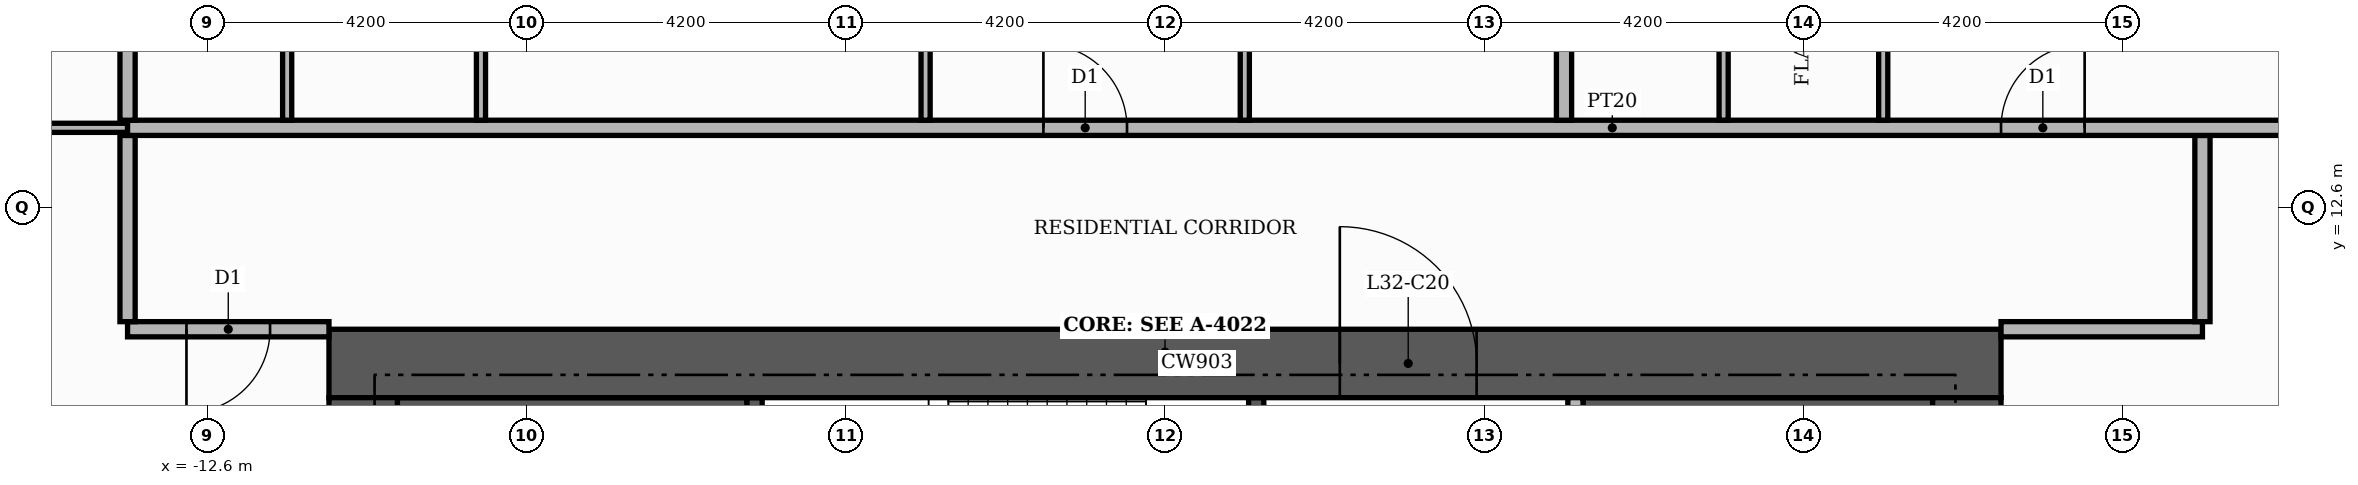
"""IFC4 building model, lengths in metres.
Left out: names, types, materials, properties, quantities, classifications, styles, units other than length and angle.
Written with IfcOpenShell. Run it as: python <this file> out.ifc"""

import sys

from ifc_helpers import new_model, si_unit, direction, frame, frame_2d, origin, place, context, subcontext, project, spatial, rectangle, extrude, element, fill, save


model = new_model("IFC4")
c1 = context("Model", 3, precision=1e-05, world=origin(), true_north=direction((0.0, 1.0)))
c2 = subcontext(c1, "Body", "Model", "MODEL_VIEW")
j1 = project(units=[si_unit("LENGTHUNIT", "METRE"), si_unit("PLANEANGLEUNIT", "RADIAN")], contexts=[c1])
p1 = place(None, origin())
s1 = spatial("IfcSite", under=j1, at=p1, CompositionType="ELEMENT")
p2 = place(p1, origin())
s2 = spatial("IfcBuilding", under=s1, at=p2, CompositionType="ELEMENT")
p3 = place(p2, frame((0.0, 0.0, 137.7)))
s3 = spatial("IfcBuildingStorey", under=s2, at=p3, CompositionType="ELEMENT", Elevation=137.7)
for number, where, z_axis, x_axis in (
    (1, (-10.1, 9.15, 0.0), (0.0, 0.0, 1.0), (1.0, 0.0, 0.0)),
    (2, (5.5, 9.15, 0.0), (0.0, 0.0, 1.0), (1.0, 0.0, 0.0)),
):
    element("IfcWall", number, at=place(p3, frame(where, z_axis=z_axis, x_axis=x_axis)), inside=s3, PredefinedType="SHEAR", context=c2, shape_type="SweptSolid", body=[
        extrude(rectangle(XDim=4.6, YDim=1.9, at=frame_2d((2.3, 0.0))), origin(), (0.0, 0.0, 1.0), 3.48),
    ])
p4 = place(p3, frame((-5.4, 7.25, 0.0), z_axis=(0.0, 0.0, 1.0), x_axis=(0.0, 1.0, 0.0)))
e3 = element("IfcWall", 3, at=p4, inside=s3, PredefinedType="SHEAR", context=c2, shape_type="SweptSolid", body=[
    extrude(rectangle(XDim=2.85, YDim=0.2, at=frame_2d((1.425, 0.0))), origin(), (0.0, 0.0, 1.0), 3.48),
])
p5 = place(p3, frame((1.2, 7.25, 0.0), z_axis=(0.0, 0.0, 1.0), x_axis=(0.0, 1.0, 0.0)))
e4 = element("IfcWall", 4, at=p5, inside=s3, PredefinedType="SHEAR", context=c2, shape_type="SweptSolid", body=[
    extrude(rectangle(XDim=2.85, YDim=0.2, at=frame_2d((1.425, 0.0))), origin(), (0.0, 0.0, 1.0), 3.48),
])
p6 = place(p5, frame((0.85, 0.0, 0.0)))
e5 = element("IfcOpeningElement", 5, at=p6, cuts=e4, PredefinedType="OPENING", context=c2, shape_type="SweptSolid", body=[
    extrude(rectangle(XDim=1.0, YDim=2.1, at=frame_2d((0.5, 1.05))), frame((0.0, 0.11, 0.0), z_axis=(0.0, -1.0, 0.0), x_axis=(1.0, 0.0, 0.0)), (0.0, 0.0, 1.0), 0.22),
])
p7 = place(p3, frame((-11.0, 10.55, 0.0), z_axis=(0.0, 0.0, 1.0), x_axis=(1.0, 0.0, 0.0)))
e6 = element("IfcWall", 6, at=p7, inside=s3, PredefinedType="SHEAR", context=c2, shape_type="SweptSolid", body=[
    extrude(rectangle(XDim=22.0, YDim=0.9, at=frame_2d((11.0, 0.0))), origin(), (0.0, 0.0, 1.0), 3.48),
])
p8 = place(p7, frame((13.3, 0.0, 0.0)))
e7 = element("IfcOpeningElement", 7, at=p8, cuts=e6, PredefinedType="OPENING", context=c2, shape_type="SweptSolid", body=[
    extrude(rectangle(XDim=1.8, YDim=2.2, at=frame_2d((0.9, 1.1))), frame((0.0, 0.46, 0.0), z_axis=(0.0, -1.0, 0.0), x_axis=(1.0, 0.0, 0.0)), (0.0, 0.0, 1.0), 0.92),
])
for number, where, z_axis, x_axis in (
    (8, (-10.55, -10.1, 0.0), (0.0, 0.0, 1.0), (0.0, 1.0, 0.0)),
    (9, (10.55, -10.1, 0.0), (0.0, 0.0, 1.0), (0.0, 1.0, 0.0)),
):
    element("IfcWall", number, at=place(p3, frame(where, z_axis=z_axis, x_axis=x_axis)), inside=s3, PredefinedType="SHEAR", context=c2, shape_type="SweptSolid", body=[
        extrude(rectangle(XDim=20.2, YDim=0.9, at=frame_2d((10.1, 0.0))), origin(), (0.0, 0.0, 1.0), 3.48),
    ])
p9 = place(p3, frame((5.4, 5.5, 0.0), z_axis=(0.0, 0.0, 1.0), x_axis=(0.0, 1.0, 0.0)))
e10 = element("IfcWall", 10, at=p9, inside=s3, PredefinedType="PARTITIONING", context=c2, shape_type="SweptSolid", body=[
    extrude(rectangle(XDim=4.6, YDim=0.2, at=frame_2d((2.3, 0.0))), origin(), (0.0, 0.0, 1.0), 3.48),
])
p10 = place(p9, frame((0.25, 0.0, 0.0)))
e11 = element("IfcOpeningElement", 11, at=p10, cuts=e10, PredefinedType="OPENING", context=c2, shape_type="SweptSolid", body=[
    extrude(rectangle(XDim=1.0, YDim=2.1, at=frame_2d((0.5, 1.05))), frame((0.0, 0.11, 0.0), z_axis=(0.0, -1.0, 0.0), x_axis=(1.0, 0.0, 0.0)), (0.0, 0.0, 1.0), 0.22),
])
p11 = place(p3, frame((-13.65, 11.0, 0.0), z_axis=(0.0, 0.0, 1.0), x_axis=(1.0, 0.0, 0.0)))
e12 = element("IfcWall", 12, at=p11, inside=s3, PredefinedType="PARTITIONING", context=c2, shape_type="SweptSolid", body=[
    extrude(rectangle(XDim=2.65, YDim=0.2, at=frame_2d((1.325, 0.0))), origin(), (0.0, 0.0, 1.0), 3.48),
])
p12 = place(p11, frame((0.775, 0.0, 0.0)))
e13 = element("IfcOpeningElement", 13, at=p12, cuts=e12, PredefinedType="OPENING", context=c2, shape_type="SweptSolid", body=[
    extrude(rectangle(XDim=1.1, YDim=2.4, at=frame_2d((0.55, 1.2))), frame((0.0, 0.11, 0.0), z_axis=(0.0, -1.0, 0.0), x_axis=(1.0, 0.0, 0.0)), (0.0, 0.0, 1.0), 0.22),
])
p13 = place(p3, frame((11.0, 11.0, 0.0), z_axis=(0.0, 0.0, 1.0), x_axis=(1.0, 0.0, 0.0)))
e14 = element("IfcWall", 14, at=p13, inside=s3, PredefinedType="PARTITIONING", context=c2, shape_type="SweptSolid", body=[
    extrude(rectangle(XDim=2.65, YDim=0.2, at=frame_2d((1.325, 0.0))), origin(), (0.0, 0.0, 1.0), 3.48),
])
for number, where, z_axis, x_axis in (
    (15, (-13.65, 11.1, 0.0), (0.0, 0.0, 1.0), (0.0, 1.0, 0.0)),
    (16, (13.65, 11.1, 0.0), (0.0, 0.0, 1.0), (0.0, 1.0, 0.0)),
):
    element("IfcWall", number, at=place(p3, frame(where, z_axis=z_axis, x_axis=x_axis)), inside=s3, PredefinedType="PARTITIONING", context=c2, shape_type="SweptSolid", body=[
        extrude(rectangle(XDim=2.45, YDim=0.2, at=frame_2d((1.225, 0.0))), origin(), (0.0, 0.0, 1.0), 3.48),
    ])
p14 = place(p3, frame((-20.42, 13.65, 0.0), z_axis=(0.0, 0.0, 1.0), x_axis=(1.0, 0.0, 0.0)))
e17 = element("IfcWall", 17, at=p14, inside=s3, PredefinedType="PARTITIONING", context=c2, shape_type="SweptSolid", body=[
    extrude(rectangle(XDim=6.77, YDim=0.12, at=frame_2d((3.385, 0.0))), origin(), (0.0, 0.0, 1.0), 3.48),
])
p15 = place(p14, frame((2.935, 0.0, 0.0)))
e18 = element("IfcOpeningElement", 18, at=p15, cuts=e17, PredefinedType="OPENING", context=c2, shape_type="SweptSolid", body=[
    extrude(rectangle(XDim=0.9, YDim=2.1, at=frame_2d((0.45, 1.05))), frame((0.0, 0.07, 0.0), z_axis=(0.0, -1.0, 0.0), x_axis=(1.0, 0.0, 0.0)), (0.0, 0.0, 1.0), 0.14),
])
p16 = place(p3, frame((-13.65, 13.65, 0.0), z_axis=(0.0, 0.0, 1.0), x_axis=(1.0, 0.0, 0.0)))
e19 = element("IfcWall", 19, at=p16, inside=s3, PredefinedType="PARTITIONING", context=c2, shape_type="SweptSolid", body=[
    extrude(rectangle(XDim=39.07, YDim=0.2, at=frame_2d((19.535, 0.0))), origin(), (0.0, 0.0, 1.0), 3.48),
])
p17 = place(p16, frame((24.65, 0.0, 0.0)))
e20 = element("IfcOpeningElement", 20, at=p17, cuts=e19, PredefinedType="OPENING", context=c2, shape_type="SweptSolid", body=[
    extrude(rectangle(XDim=1.1, YDim=2.4, at=frame_2d((0.55, 1.2))), frame((0.0, 0.11, 0.0), z_axis=(0.0, -1.0, 0.0), x_axis=(1.0, 0.0, 0.0)), (0.0, 0.0, 1.0), 0.22),
])
p18 = place(p16, frame((12.05, 0.0, 0.0)))
e21 = element("IfcOpeningElement", 21, at=p18, cuts=e19, PredefinedType="OPENING", context=c2, shape_type="SweptSolid", body=[
    extrude(rectangle(XDim=1.1, YDim=2.4, at=frame_2d((0.55, 1.2))), frame((0.0, 0.11, 0.0), z_axis=(0.0, -1.0, 0.0), x_axis=(1.0, 0.0, 0.0)), (0.0, 0.0, 1.0), 0.22),
])
p19 = place(p3, frame((-13.65, 13.75, 0.0), z_axis=(0.0, 0.0, 1.0), x_axis=(0.0, 1.0, 0.0)))
e22 = element("IfcWall", 22, at=p19, inside=s3, PredefinedType="PARTITIONING", context=c2, shape_type="SweptSolid", body=[
    extrude(rectangle(XDim=11.67, YDim=0.2, at=frame_2d((5.835, 0.0))), origin(), (0.0, 0.0, 1.0), 3.48),
])
for number, where, z_axis, x_axis in (
    (23, (-11.55, 13.75, 0.0), (0.0, 0.0, 1.0), (0.0, 1.0, 0.0)),
    (24, (-9.0, 13.75, 0.0), (0.0, 0.0, 1.0), (0.0, 1.0, 0.0)),
    (25, (-3.15, 13.75, 0.0), (0.0, 0.0, 1.0), (0.0, 1.0, 0.0)),
):
    element("IfcWall", number, at=place(p3, frame(where, z_axis=z_axis, x_axis=x_axis)), inside=s3, PredefinedType="PARTITIONING", context=c2, shape_type="SweptSolid", body=[
        extrude(rectangle(XDim=4.51, YDim=0.12, at=frame_2d((2.255, 0.0))), origin(), (0.0, 0.0, 1.0), 3.48),
    ])
p20 = place(p3, frame((1.05, 13.75, 0.0), z_axis=(0.0, 0.0, 1.0), x_axis=(0.0, 1.0, 0.0)))
e26 = element("IfcWall", 26, at=p20, inside=s3, PredefinedType="PARTITIONING", context=c2, shape_type="SweptSolid", body=[
    extrude(rectangle(XDim=4.51, YDim=0.12, at=frame_2d((2.255, 0.0))), origin(), (0.0, 0.0, 1.0), 3.48),
])
p21 = place(p20, frame((1.735, 0.0, 0.0)))
e27 = element("IfcOpeningElement", 27, at=p21, cuts=e26, PredefinedType="OPENING", context=c2, shape_type="SweptSolid", body=[
    extrude(rectangle(XDim=1.0, YDim=2.1, at=frame_2d((0.5, 1.05))), frame((0.0, 0.07, 0.0), z_axis=(0.0, -1.0, 0.0), x_axis=(1.0, 0.0, 0.0)), (0.0, 0.0, 1.0), 0.14),
])
p22 = place(p3, frame((5.25, 13.75, 0.0), z_axis=(0.0, 0.0, 1.0), x_axis=(0.0, 1.0, 0.0)))
e28 = element("IfcWall", 28, at=p22, inside=s3, PredefinedType="PARTITIONING", context=c2, shape_type="SweptSolid", body=[
    extrude(rectangle(XDim=11.67, YDim=0.2, at=frame_2d((5.835, 0.0))), origin(), (0.0, 0.0, 1.0), 3.48),
])
p23 = place(p3, frame((7.35, 13.75, 0.0), z_axis=(0.0, 0.0, 1.0), x_axis=(0.0, 1.0, 0.0)))
e29 = element("IfcWall", 29, at=p23, inside=s3, PredefinedType="PARTITIONING", context=c2, shape_type="SweptSolid", body=[
    extrude(rectangle(XDim=5.11, YDim=0.12, at=frame_2d((2.555, 0.0))), origin(), (0.0, 0.0, 1.0), 3.48),
])
p24 = place(p3, frame((9.45, 13.75, 0.0), z_axis=(0.0, 0.0, 1.0), x_axis=(0.0, 1.0, 0.0)))
e30 = element("IfcWall", 30, at=p24, inside=s3, PredefinedType="PARTITIONING", context=c2, shape_type="SweptSolid", body=[
    extrude(rectangle(XDim=5.11, YDim=0.12, at=frame_2d((2.555, 0.0))), origin(), (0.0, 0.0, 1.0), 3.48),
])
p25 = place(p24, frame((2.085, 0.0, 0.0)))
e31 = element("IfcOpeningElement", 31, at=p25, cuts=e30, PredefinedType="OPENING", context=c2, shape_type="SweptSolid", body=[
    extrude(rectangle(XDim=0.9, YDim=2.1, at=frame_2d((0.45, 1.05))), frame((0.0, 0.07, 0.0), z_axis=(0.0, -1.0, 0.0), x_axis=(1.0, 0.0, 0.0)), (0.0, 0.0, 1.0), 0.14),
])
p26 = place(p8, origin())
e32 = element("IfcDoor", 32, at=p26, inside=s3, OperationType="DOUBLE_DOOR_SINGLE_SWING", PredefinedType="DOOR", context=c2, shape_type="SweptSolid", body=[
    extrude(rectangle(XDim=1.8, YDim=2.2, at=frame_2d((0.9, 1.1))), frame((0.0, 0.025, 0.0), z_axis=(0.0, -1.0, 0.0), x_axis=(1.0, 0.0, 0.0)), (0.0, 0.0, 1.0), 0.05),
])
fill(e7, e32)
p27 = place(p17, origin())
e33 = element("IfcDoor", 33, at=p27, inside=s3, OperationType="SINGLE_SWING_RIGHT", PredefinedType="DOOR", context=c2, shape_type="SweptSolid", body=[
    extrude(rectangle(XDim=1.1, YDim=2.4, at=frame_2d((0.55, 1.2))), frame((0.0, 0.025, 0.0), z_axis=(0.0, -1.0, 0.0), x_axis=(1.0, 0.0, 0.0)), (0.0, 0.0, 1.0), 0.05),
])
fill(e20, e33)
p28 = place(p18, origin())
e34 = element("IfcDoor", 34, at=p28, inside=s3, OperationType="SINGLE_SWING_LEFT", PredefinedType="DOOR", context=c2, shape_type="SweptSolid", body=[
    extrude(rectangle(XDim=1.1, YDim=2.4, at=frame_2d((0.55, 1.2))), frame((0.0, 0.025, 0.0), z_axis=(0.0, -1.0, 0.0), x_axis=(1.0, 0.0, 0.0)), (0.0, 0.0, 1.0), 0.05),
])
fill(e21, e34)
p29 = place(p12, frame((1.1, 0.0, 0.0), z_axis=(0.0, 0.0, 1.0), x_axis=(-1.0, 0.0, 0.0)))
e35 = element("IfcDoor", 35, at=p29, inside=s3, OperationType="SINGLE_SWING_LEFT", PredefinedType="DOOR", context=c2, shape_type="SweptSolid", body=[
    extrude(rectangle(XDim=1.1, YDim=2.4, at=frame_2d((0.55, 1.2))), frame((0.0, 0.025, 0.0), z_axis=(0.0, -1.0, 0.0), x_axis=(1.0, 0.0, 0.0)), (0.0, 0.0, 1.0), 0.05),
])
fill(e13, e35)
save(model, sys.argv[1])
